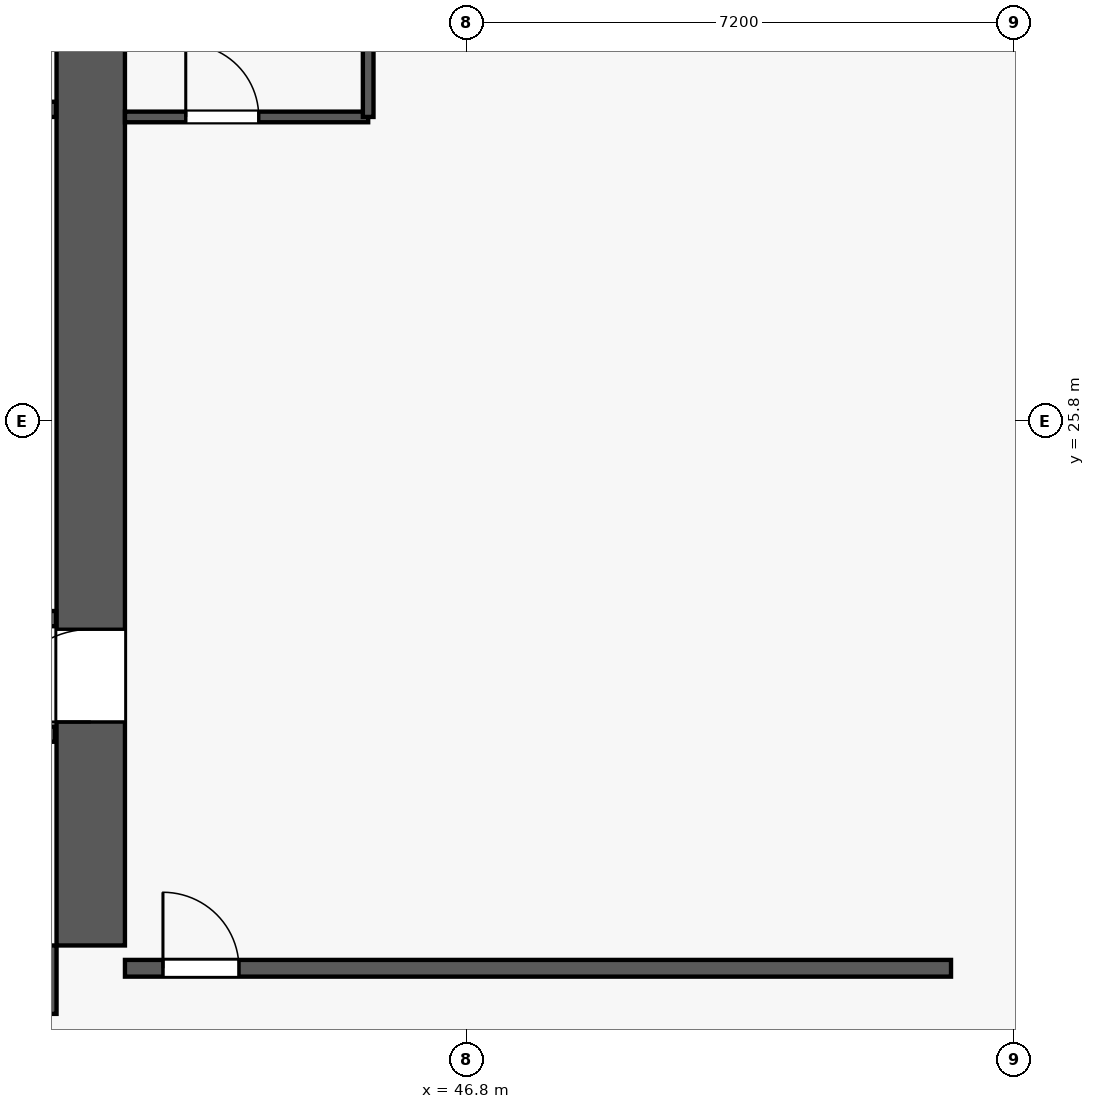
"""IFC4 building model, lengths in metres.
Left out: names, types, materials, properties, quantities, classifications, styles, units other than length and angle.
Written with IfcOpenShell. Run it as: python <this file> out.ifc"""

import sys

from ifc_helpers import new_model, si_unit, direction, frame, frame_2d, origin, origin_2d, place, context, subcontext, project, spatial, rectangle, extrude, element, fill, save


model = new_model("IFC4")
c1 = context("Model", 3, precision=1e-05, world=origin(), true_north=direction((0.0, 1.0)))
c2 = subcontext(c1, "Body", "Model", "MODEL_VIEW")
j1 = project(units=[si_unit("LENGTHUNIT", "METRE"), si_unit("PLANEANGLEUNIT", "RADIAN")], contexts=[c1])
p1 = place(None, origin())
s1 = spatial("IfcSite", under=j1, at=p1, CompositionType="ELEMENT")
p2 = place(p1, origin())
s2 = spatial("IfcBuilding", under=s1, at=p2, CompositionType="ELEMENT")
p3 = place(p2, frame((0.0, 0.0, 74.6)))
s3 = spatial("IfcBuildingStorey", under=s2, at=p3, CompositionType="ELEMENT", Elevation=74.6)
p4 = place(p3, frame((41.85, 18.45, 0.0), z_axis=(0.0, 0.0, 1.0), x_axis=(1.0, 0.0, 0.0)))
e1 = element("IfcColumn", 1, at=p4, inside=s3, PredefinedType="COLUMN", context=c2, shape_type="SweptSolid", body=[
    extrude(rectangle(XDim=0.9, YDim=0.9, at=origin_2d()), origin(), (0.0, 0.0, 1.0), 5.4),
])
p5 = place(p3, frame((23.4, 18.45, 0.0), z_axis=(0.0, 0.0, 1.0), x_axis=(1.0, 0.0, 0.0)))
e2 = element("IfcWall", 2, at=p5, inside=s3, PredefinedType="SHEAR", context=c2, shape_type="SweptSolid", body=[
    extrude(rectangle(XDim=18.0, YDim=0.9, at=frame_2d((9.0, 0.0))), origin(), (0.0, 0.0, 1.0), 5.18),
])
p6 = place(p3, frame((41.85, 18.9, 0.0), z_axis=(0.0, 0.0, 1.0), x_axis=(0.0, 1.0, 0.0)))
e3 = element("IfcWall", 3, at=p6, inside=s3, PredefinedType="SHEAR", context=c2, shape_type="SweptSolid", body=[
    extrude(rectangle(XDim=14.0, YDim=0.9, at=frame_2d((7.0, 0.0))), origin(), (0.0, 0.0, 1.0), 5.18),
])
p7 = place(p6, frame((2.94, 0.0, 0.0)))
e4 = element("IfcOpeningElement", 4, at=p7, cuts=e3, PredefinedType="OPENING", context=c2, shape_type="SweptSolid", body=[
    extrude(rectangle(XDim=1.22, YDim=2.25, at=frame_2d((0.61, 1.125))), frame((0.0, 0.46, 0.0), z_axis=(0.0, -1.0, 0.0), x_axis=(1.0, 0.0, 0.0)), (0.0, 0.0, 1.0), 0.92),
])
p8 = place(p3, frame((38.125, 23.2, 0.0), z_axis=(0.0, 0.0, 1.0), x_axis=(1.0, 0.0, 0.0)))
e5 = element("IfcWall", 5, at=p8, inside=s3, PredefinedType="PLUMBINGWALL", context=c2, shape_type="SweptSolid", body=[
    extrude(rectangle(XDim=3.27, YDim=0.2, at=frame_2d((1.635, 0.0))), origin(), (0.0, 0.0, 1.0), 5.18),
])
p9 = place(p3, frame((38.125, 29.9, 0.0), z_axis=(0.0, 0.0, 1.0), x_axis=(1.0, 0.0, 0.0)))
e6 = element("IfcWall", 6, at=p9, inside=s3, PredefinedType="PLUMBINGWALL", context=c2, shape_type="SweptSolid", body=[
    extrude(rectangle(XDim=3.27, YDim=0.2, at=frame_2d((1.635, 0.0))), origin(), (0.0, 0.0, 1.0), 5.18),
])
p10 = place(p9, frame((0.5, 0.0, 0.0)))
e7 = element("IfcOpeningElement", 7, at=p10, cuts=e6, PredefinedType="OPENING", context=c2, shape_type="SweptSolid", body=[
    extrude(rectangle(XDim=0.85, YDim=2.05, at=frame_2d((0.425, 1.025))), frame((0.0, 0.11, 0.0), z_axis=(0.0, -1.0, 0.0), x_axis=(1.0, 0.0, 0.0)), (0.0, 0.0, 1.0), 0.22),
])
p11 = place(p3, frame((23.42, 21.68, 0.0), z_axis=(0.0, 0.0, 1.0), x_axis=(1.0, 0.0, 0.0)))
e8 = element("IfcWall", 8, at=p11, inside=s3, PredefinedType="PLUMBINGWALL", context=c2, shape_type="SweptSolid", body=[
    extrude(rectangle(XDim=17.96, YDim=0.2, at=frame_2d((8.98, 0.0))), origin(), (0.0, 0.0, 1.0), 5.18),
])
p12 = place(p11, frame((4.45, 0.0, 0.0)))
e9 = element("IfcOpeningElement", 9, at=p12, cuts=e8, PredefinedType="OPENING", context=c2, shape_type="SweptSolid", body=[
    extrude(rectangle(XDim=1.1, YDim=2.2, at=frame_2d((0.55, 1.1))), frame((0.0, 0.11, 0.0), z_axis=(0.0, -1.0, 0.0), x_axis=(1.0, 0.0, 0.0)), (0.0, 0.0, 1.0), 0.22),
])
p13 = place(p11, frame((6.85, 0.0, 0.0)))
e10 = element("IfcOpeningElement", 10, at=p13, cuts=e8, PredefinedType="OPENING", context=c2, shape_type="SweptSolid", body=[
    extrude(rectangle(XDim=1.1, YDim=2.2, at=frame_2d((0.55, 1.1))), frame((0.0, 0.11, 0.0), z_axis=(0.0, -1.0, 0.0), x_axis=(1.0, 0.0, 0.0)), (0.0, 0.0, 1.0), 0.22),
])
p14 = place(p11, frame((9.25, 0.0, 0.0)))
e11 = element("IfcOpeningElement", 11, at=p14, cuts=e8, PredefinedType="OPENING", context=c2, shape_type="SweptSolid", body=[
    extrude(rectangle(XDim=1.1, YDim=2.2, at=frame_2d((0.55, 1.1))), frame((0.0, 0.11, 0.0), z_axis=(0.0, -1.0, 0.0), x_axis=(1.0, 0.0, 0.0)), (0.0, 0.0, 1.0), 0.22),
])
p15 = place(p11, frame((0.25, 0.0, 0.0)))
e12 = element("IfcOpeningElement", 12, at=p15, cuts=e8, PredefinedType="OPENING", context=c2, shape_type="SweptSolid", body=[
    extrude(rectangle(XDim=0.85, YDim=2.05, at=frame_2d((0.425, 1.025))), frame((0.0, 0.11, 0.0), z_axis=(0.0, -1.0, 0.0), x_axis=(1.0, 0.0, 0.0)), (0.0, 0.0, 1.0), 0.22),
])
p16 = place(p11, frame((2.05, 0.0, 0.0)))
e13 = element("IfcOpeningElement", 13, at=p16, cuts=e8, PredefinedType="OPENING", context=c2, shape_type="SweptSolid", body=[
    extrude(rectangle(XDim=0.85, YDim=2.05, at=frame_2d((0.425, 1.025))), frame((0.0, 0.11, 0.0), z_axis=(0.0, -1.0, 0.0), x_axis=(1.0, 0.0, 0.0)), (0.0, 0.0, 1.0), 0.22),
])
p17 = place(p11, frame((14.6, 0.0, 0.0)))
e14 = element("IfcOpeningElement", 14, at=p17, cuts=e8, PredefinedType="OPENING", context=c2, shape_type="SweptSolid", body=[
    extrude(rectangle(XDim=0.85, YDim=2.05, at=frame_2d((0.425, 1.025))), frame((0.0, 0.11, 0.0), z_axis=(0.0, -1.0, 0.0), x_axis=(1.0, 0.0, 0.0)), (0.0, 0.0, 1.0), 0.22),
])
p18 = place(p3, frame((42.3, 18.6, 0.0), z_axis=(0.0, 0.0, 1.0), x_axis=(1.0, 0.0, 0.0)))
e15 = element("IfcWall", 15, at=p18, inside=s3, PredefinedType="PARTITIONING", context=c2, shape_type="SweptSolid", body=[
    extrude(rectangle(XDim=10.868, YDim=0.22, at=frame_2d((5.434, 0.0))), origin(), (0.0, 0.0, 1.0), 4.487),
])
p19 = place(p18, frame((0.5, 0.0, 0.0)))
e16 = element("IfcOpeningElement", 16, at=p19, cuts=e15, PredefinedType="OPENING", context=c2, shape_type="SweptSolid", body=[
    extrude(rectangle(XDim=1.0, YDim=2.15, at=frame_2d((0.5, 1.075))), frame((0.0, 0.12, 0.0), z_axis=(0.0, -1.0, 0.0), x_axis=(1.0, 0.0, 0.0)), (0.0, 0.0, 1.0), 0.24),
])
p20 = place(p3, frame((42.3, 29.8, 0.0), z_axis=(0.0, 0.0, 1.0), x_axis=(1.0, 0.0, 0.0)))
e17 = element("IfcWall", 17, at=p20, inside=s3, PredefinedType="PLUMBINGWALL", context=c2, shape_type="SweptSolid", body=[
    extrude(rectangle(XDim=3.2, YDim=0.14, at=frame_2d((1.6, 0.0))), origin(), (0.0, 0.0, 1.0), 5.18),
])
p21 = place(p20, frame((0.8, 0.0, 0.0)))
e18 = element("IfcOpeningElement", 18, at=p21, cuts=e17, PredefinedType="OPENING", context=c2, shape_type="SweptSolid", body=[
    extrude(rectangle(XDim=0.96, YDim=2.15, at=frame_2d((0.48, 1.075))), frame((0.0, 0.08, 0.0), z_axis=(0.0, -1.0, 0.0), x_axis=(1.0, 0.0, 0.0)), (0.0, 0.0, 1.0), 0.16),
])
p22 = place(p3, frame((45.5, 29.8, 0.0), z_axis=(0.0, 0.0, 1.0), x_axis=(0.0, 1.0, 0.0)))
e19 = element("IfcWall", 19, at=p22, inside=s3, PredefinedType="PLUMBINGWALL", context=c2, shape_type="SweptSolid", body=[
    extrude(rectangle(XDim=3.4, YDim=0.14, at=frame_2d((1.7, 0.0))), origin(), (0.0, 0.0, 1.0), 5.18),
])
p23 = place(p7, origin())
e20 = element("IfcDoor", 20, at=p23, inside=s3, OperationType="SINGLE_SWING_LEFT", PredefinedType="DOOR", context=c2, shape_type="SweptSolid", body=[
    extrude(rectangle(XDim=1.22, YDim=2.25, at=frame_2d((0.61, 1.125))), frame((0.0, 0.025, 0.0), z_axis=(0.0, -1.0, 0.0), x_axis=(1.0, 0.0, 0.0)), (0.0, 0.0, 1.0), 0.05),
])
fill(e4, e20)
p24 = place(p21, origin())
e21 = element("IfcDoor", 21, at=p24, inside=s3, OperationType="SINGLE_SWING_LEFT", PredefinedType="DOOR", context=c2, shape_type="SweptSolid", body=[
    extrude(rectangle(XDim=0.96, YDim=2.15, at=frame_2d((0.48, 1.075))), frame((0.0, 0.025, 0.0), z_axis=(0.0, -1.0, 0.0), x_axis=(1.0, 0.0, 0.0)), (0.0, 0.0, 1.0), 0.05),
])
fill(e18, e21)
p25 = place(p19, origin())
e22 = element("IfcDoor", 22, at=p25, inside=s3, OperationType="SINGLE_SWING_LEFT", PredefinedType="DOOR", context=c2, shape_type="SweptSolid", body=[
    extrude(rectangle(XDim=1.0, YDim=2.15, at=frame_2d((0.5, 1.075))), frame((0.0, 0.025, 0.0), z_axis=(0.0, -1.0, 0.0), x_axis=(1.0, 0.0, 0.0)), (0.0, 0.0, 1.0), 0.05),
])
fill(e16, e22)
save(model, sys.argv[1])
